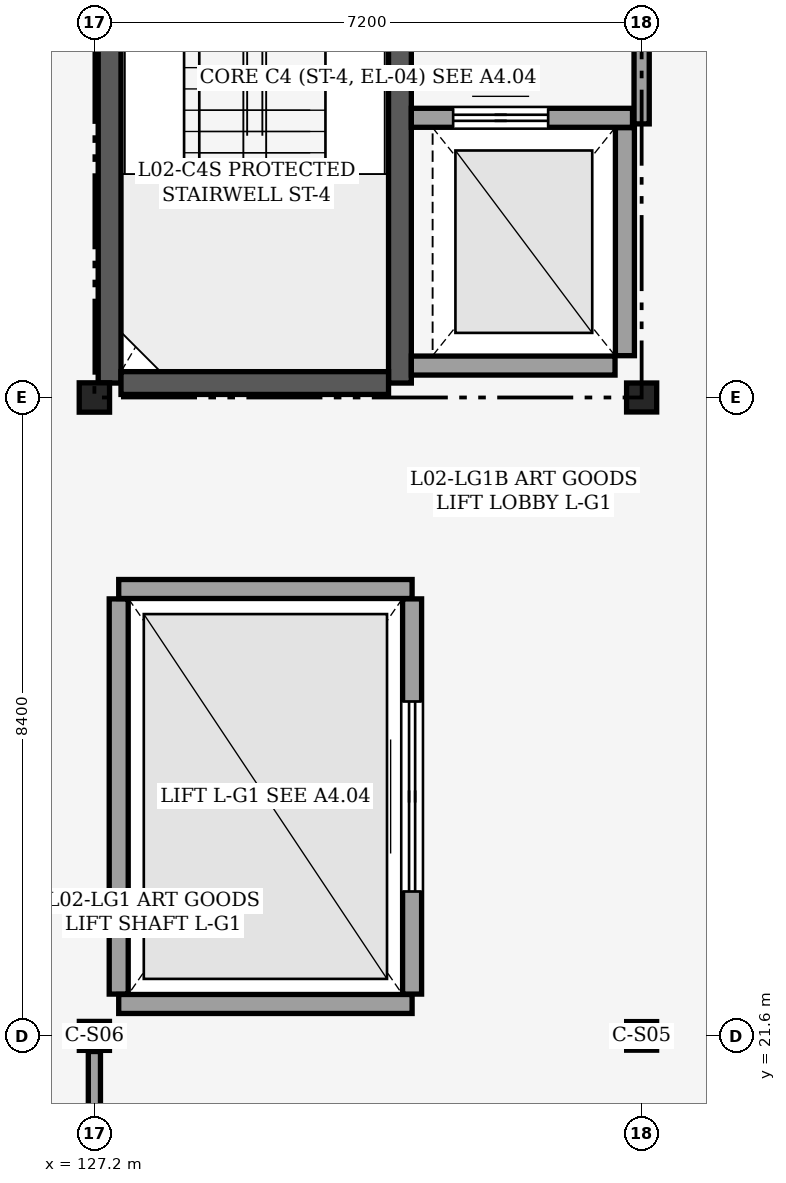
"""IFC4 building model, lengths in metres.
Left out: names, types, materials, properties, quantities, classifications, styles, units other than length and angle.
Written with IfcOpenShell. Run it as: python <this file> out.ifc"""

import sys

from ifc_helpers import new_model, si_unit, direction, frame, frame_2d, origin, origin_2d, place, context, subcontext, project, spatial, rectangle, i_section, extrude, element, fill, save


model = new_model("IFC4")
c1 = context("Model", 3, precision=1e-05, world=origin(), true_north=direction((0.0, 1.0)))
c2 = subcontext(c1, "Body", "Model", "MODEL_VIEW")
j1 = project(units=[si_unit("LENGTHUNIT", "METRE"), si_unit("PLANEANGLEUNIT", "RADIAN")], contexts=[c1])
p1 = place(None, origin())
s1 = spatial("IfcSite", under=j1, at=p1, CompositionType="ELEMENT")
p2 = place(p1, origin())
s2 = spatial("IfcBuilding", under=s1, at=p2, CompositionType="ELEMENT")
p3 = place(p2, frame((0.0, 0.0, 10.2)))
s3 = spatial("IfcBuildingStorey", under=s2, at=p3, CompositionType="ELEMENT", Elevation=10.2)
p4 = place(p3, frame((127.2, 21.6, 0.0), z_axis=(0.0, 0.0, 1.0), x_axis=(1.0, 0.0, 0.0)))
e1 = element("IfcColumn", 1, at=p4, inside=s3, PredefinedType="COLUMN", context=c2, shape_type="SweptSolid", body=[
    extrude(i_section(OverallWidth=0.396, OverallDepth=0.381, WebThickness=0.019, FlangeThickness=0.03, FilletRadius=0.025, at=origin_2d()), origin(), (0.0, 0.0, 1.0), 4.8),
])
p5 = place(p3, frame((127.2, 30.0, 0.0), z_axis=(0.0, 0.0, 1.0), x_axis=(1.0, 0.0, 0.0)))
e2 = element("IfcColumn", 2, at=p5, inside=s3, PredefinedType="COLUMN", context=c2, shape_type="SweptSolid", body=[
    extrude(i_section(OverallWidth=0.399, OverallDepth=0.386, WebThickness=0.021, FlangeThickness=0.033, FilletRadius=0.025, at=origin_2d()), origin(), (0.0, 0.0, 1.0), 4.8),
])
p6 = place(p3, frame((134.4, 21.6, 0.0), z_axis=(0.0, 0.0, 1.0), x_axis=(1.0, 0.0, 0.0)))
e3 = element("IfcColumn", 3, at=p6, inside=s3, PredefinedType="COLUMN", context=c2, shape_type="SweptSolid", body=[
    extrude(i_section(OverallWidth=0.394, OverallDepth=0.376, WebThickness=0.017, FlangeThickness=0.028, FilletRadius=0.025, at=origin_2d()), origin(), (0.0, 0.0, 1.0), 4.8),
])
p7 = place(p3, frame((134.4, 30.0, 0.0), z_axis=(0.0, 0.0, 1.0), x_axis=(1.0, 0.0, 0.0)))
e4 = element("IfcColumn", 4, at=p7, inside=s3, PredefinedType="COLUMN", context=c2, shape_type="SweptSolid", body=[
    extrude(i_section(OverallWidth=0.396, OverallDepth=0.381, WebThickness=0.019, FlangeThickness=0.03, FilletRadius=0.025, at=origin_2d()), origin(), (0.0, 0.0, 1.0), 4.8),
])
p8 = place(p3, frame((127.4, 30.19, 0.0), z_axis=(0.0, 0.0, 1.0), x_axis=(0.0, 1.0, 0.0)))
e5 = element("IfcWall", 5, at=p8, inside=s3, PredefinedType="SHEAR", context=c2, shape_type="SweptSolid", body=[
    extrude(rectangle(XDim=8.02, YDim=0.3, at=frame_2d((4.01, 0.0))), origin(), (0.0, 0.0, 1.0), 4.56),
])
p9 = place(p3, frame((131.22, 30.19, 0.0), z_axis=(0.0, 0.0, 1.0), x_axis=(0.0, 1.0, 0.0)))
e6 = element("IfcWall", 6, at=p9, inside=s3, PredefinedType="SHEAR", context=c2, shape_type="SweptSolid", body=[
    extrude(rectangle(XDim=8.02, YDim=0.3, at=frame_2d((4.01, 0.0))), origin(), (0.0, 0.0, 1.0), 4.56),
])
p10 = place(p9, frame((6.47, 0.0, 0.0)))
e7 = element("IfcOpeningElement", 7, at=p10, cuts=e6, PredefinedType="OPENING", context=c2, shape_type="SweptSolid", body=[
    extrude(rectangle(XDim=1.1, YDim=2.15, at=frame_2d((0.55, 1.075))), frame((0.0, 0.16, 0.0), z_axis=(0.0, -1.0, 0.0), x_axis=(1.0, 0.0, 0.0)), (0.0, 0.0, 1.0), 0.321),
])
p11 = place(p3, frame((127.55, 30.19, 0.0), z_axis=(0.0, 0.0, 1.0), x_axis=(1.0, 0.0, 0.0)))
e8 = element("IfcWall", 8, at=p11, inside=s3, PredefinedType="SHEAR", context=c2, shape_type="SweptSolid", body=[
    extrude(rectangle(XDim=3.52, YDim=0.3, at=frame_2d((1.76, 0.0))), origin(), (0.0, 0.0, 1.0), 4.56),
])
p12 = place(p3, frame((131.37, 30.42, 0.0), z_axis=(0.0, 0.0, 1.0), x_axis=(1.0, 0.0, 0.0)))
e9 = element("IfcWall", 9, at=p12, inside=s3, PredefinedType="PARTITIONING", context=c2, shape_type="SweptSolid", body=[
    extrude(rectangle(XDim=2.68, YDim=0.25, at=frame_2d((1.34, 0.0))), origin(), (0.0, 0.0, 1.0), 4.56),
])
p13 = place(p3, frame((134.18, 30.55, 0.0), z_axis=(0.0, 0.0, 1.0), x_axis=(0.0, 1.0, 0.0)))
e10 = element("IfcWall", 10, at=p13, inside=s3, PredefinedType="PARTITIONING", context=c2, shape_type="SweptSolid", body=[
    extrude(rectangle(XDim=3.0, YDim=0.25, at=frame_2d((1.5, 0.0))), origin(), (0.0, 0.0, 1.0), 3.684),
])
p14 = place(p3, frame((131.37, 33.68, 0.0), z_axis=(0.0, 0.0, 1.0), x_axis=(1.0, 0.0, 0.0)))
e11 = element("IfcWall", 11, at=p14, inside=s3, PredefinedType="PARTITIONING", context=c2, shape_type="SweptSolid", body=[
    extrude(rectangle(XDim=2.91, YDim=0.25, at=frame_2d((1.455, 0.0))), origin(), (0.0, 0.0, 1.0), 4.56),
])
p15 = place(p14, frame((0.55, 0.0, 0.0)))
e12 = element("IfcOpeningElement", 12, at=p15, cuts=e11, PredefinedType="OPENING", context=c2, shape_type="SweptSolid", body=[
    extrude(rectangle(XDim=1.25, YDim=2.15, at=frame_2d((0.625, 1.075))), frame((0.0, 0.135, 0.0), z_axis=(0.0, -1.0, 0.0), x_axis=(1.0, 0.0, 0.0)), (0.0, 0.0, 1.0), 0.271),
])
p16 = place(p3, frame((134.4, 33.6, 0.0), z_axis=(0.0, 0.0, 1.0), x_axis=(0.0, 1.0, 0.0)))
e13 = element("IfcWall", 13, at=p16, inside=s3, PredefinedType="PARTITIONING", context=c2, shape_type="SweptSolid", body=[
    extrude(rectangle(XDim=4.58, YDim=0.2, at=frame_2d((2.29, 0.0))), origin(), (0.0, 0.0, 1.0), 3.684),
])
p17 = place(p3, frame((127.52, 22.15, 0.0), z_axis=(0.0, 0.0, 1.0), x_axis=(0.0, 1.0, 0.0)))
e14 = element("IfcWall", 14, at=p17, inside=s3, PredefinedType="PARTITIONING", context=c2, shape_type="SweptSolid", body=[
    extrude(rectangle(XDim=5.2, YDim=0.25, at=frame_2d((2.6, 0.0))), origin(), (0.0, 0.0, 1.0), 3.847),
])
for number, where, z_axis, x_axis in (
    (15, (127.52, 27.48, 0.0), (0.0, 0.0, 1.0), (1.0, 0.0, 0.0)),
    (16, (127.52, 22.02, 0.0), (0.0, 0.0, 1.0), (1.0, 0.0, 0.0)),
):
    element("IfcWall", number, at=place(p3, frame(where, z_axis=z_axis, x_axis=x_axis)), inside=s3, PredefinedType="PARTITIONING", context=c2, shape_type="SweptSolid", body=[
        extrude(rectangle(XDim=3.86, YDim=0.25, at=frame_2d((1.93, 0.0))), origin(), (0.0, 0.0, 1.0), 4.56),
    ])
p18 = place(p3, frame((131.38, 22.15, 0.0), z_axis=(0.0, 0.0, 1.0), x_axis=(0.0, 1.0, 0.0)))
e17 = element("IfcWall", 17, at=p18, inside=s3, PredefinedType="PARTITIONING", context=c2, shape_type="SweptSolid", body=[
    extrude(rectangle(XDim=5.2, YDim=0.25, at=frame_2d((2.6, 0.0))), origin(), (0.0, 0.0, 1.0), 4.56),
])
p19 = place(p18, frame((1.35, 0.0, 0.0)))
e18 = element("IfcOpeningElement", 18, at=p19, cuts=e17, PredefinedType="OPENING", context=c2, shape_type="SweptSolid", body=[
    extrude(rectangle(XDim=2.5, YDim=2.6, at=frame_2d((1.25, 1.3))), frame((0.0, 0.135, 0.0), z_axis=(0.0, -1.0, 0.0), x_axis=(1.0, 0.0, 0.0)), (0.0, 0.0, 1.0), 0.271),
])
p20 = place(p3, frame((127.2, 14.596, 0.0), z_axis=(0.0, 0.0, 1.0), x_axis=(0.0, 1.0, 0.0)))
e19 = element("IfcWall", 19, at=p20, inside=s3, PredefinedType="PARTITIONING", context=c2, shape_type="SweptSolid", body=[
    extrude(rectangle(XDim=6.798, YDim=0.16, at=frame_2d((3.399, 0.0))), origin(), (0.0, 0.0, 1.0), 4.007),
])
p21 = place(p15, origin())
e20 = element("IfcDoor", 20, at=p21, inside=s3, OperationType="DOUBLE_DOOR_SLIDING", PredefinedType="DOOR", context=c2, shape_type="SweptSolid", body=[
    extrude(rectangle(XDim=1.25, YDim=2.15, at=frame_2d((0.625, 1.075))), frame((0.0, 0.025, 0.0), z_axis=(0.0, -1.0, 0.0), x_axis=(1.0, 0.0, 0.0)), (0.0, 0.0, 1.0), 0.05),
])
fill(e12, e20)
p22 = place(p19, origin())
e21 = element("IfcDoor", 21, at=p22, inside=s3, OperationType="DOUBLE_DOOR_SLIDING", PredefinedType="DOOR", context=c2, shape_type="SweptSolid", body=[
    extrude(rectangle(XDim=2.5, YDim=2.6, at=frame_2d((1.25, 1.3))), frame((0.0, 0.025, 0.0), z_axis=(0.0, -1.0, 0.0), x_axis=(1.0, 0.0, 0.0)), (0.0, 0.0, 1.0), 0.05),
])
fill(e18, e21)
save(model, sys.argv[1])
